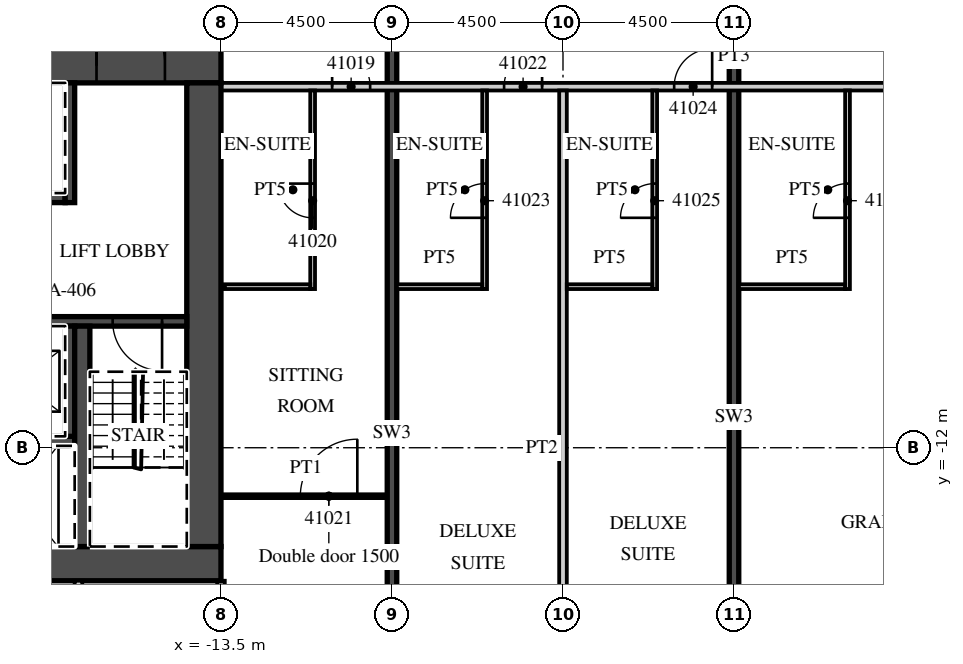
"""IFC4 building model, lengths in metres.
Left out: names, types, materials, properties, quantities, classifications, styles, units other than length and angle.
Written with IfcOpenShell. Run it as: python <this file> out.ifc"""

import sys

from ifc_helpers import new_model, si_unit, direction, frame, frame_2d, origin, place, context, subcontext, project, spatial, rectangle, extrude, element, fill, save


model = new_model("IFC4")
c1 = context("Model", 3, precision=1e-05, world=origin(), true_north=direction((0.0, 1.0)))
c2 = subcontext(c1, "Body", "Model", "MODEL_VIEW")
j1 = project(units=[si_unit("LENGTHUNIT", "METRE"), si_unit("PLANEANGLEUNIT", "RADIAN")], contexts=[c1])
p1 = place(None, origin())
s1 = spatial("IfcSite", under=j1, at=p1, CompositionType="ELEMENT")
p2 = place(p1, origin())
s2 = spatial("IfcBuilding", under=s1, at=p2, CompositionType="ELEMENT")
p3 = place(p2, frame((0.0, 0.0, 176.8)))
s3 = spatial("IfcBuildingStorey", under=s2, at=p3, CompositionType="ELEMENT", Elevation=176.8)
p4 = place(p3, frame((-9.0, -21.845, 0.0), z_axis=(0.0, 0.0, 1.0), x_axis=(0.0, 1.0, 0.0)))
e1 = element("IfcWall", 1, at=p4, inside=s3, PredefinedType="SHEAR", context=c2, shape_type="SweptSolid", body=[
    extrude(rectangle(XDim=20.445, YDim=0.25, at=frame_2d((10.223, 0.0))), origin(), (0.0, 0.0, 1.0), 3.3),
])
p5 = place(p3, frame((0.0, -20.979, 0.0), z_axis=(0.0, 0.0, 1.0), x_axis=(0.0, 1.0, 0.0)))
e2 = element("IfcWall", 2, at=p5, inside=s3, PredefinedType="SHEAR", context=c2, shape_type="SweptSolid", body=[
    extrude(rectangle(XDim=19.579, YDim=0.25, at=frame_2d((9.789, 0.0))), origin(), (0.0, 0.0, 1.0), 3.3),
])
p6 = place(p3, frame((-13.5, -22.3, 0.0), z_axis=(0.0, 0.0, 1.0), x_axis=(0.0, 1.0, 0.0)))
e3 = element("IfcWall", 3, at=p6, inside=s3, PredefinedType="PARTITIONING", context=c2, shape_type="SweptSolid", body=[
    extrude(rectangle(XDim=6.8, YDim=0.2, at=frame_2d((3.4, 0.0))), origin(), (0.0, 0.0, 1.0), 3.02),
])
p7 = place(p3, frame((-13.5, -2.5, 0.0), z_axis=(0.0, 0.0, 1.0), x_axis=(1.0, 0.0, 0.0)))
e4 = element("IfcWall", 4, at=p7, inside=s3, PredefinedType="PARTITIONING", context=c2, shape_type="SweptSolid", body=[
    extrude(rectangle(XDim=27.0, YDim=0.2, at=frame_2d((13.5, 0.0))), origin(), (0.0, 0.0, 1.0), 3.02),
])
p8 = place(p7, frame((2.925, 0.0, 0.0)))
e5 = element("IfcOpeningElement", 5, at=p8, cuts=e4, PredefinedType="OPENING", context=c2, shape_type="SweptSolid", body=[
    extrude(rectangle(XDim=1.0, YDim=2.1, at=frame_2d((0.5, 1.05))), frame((0.0, 0.11, 0.0), z_axis=(0.0, -1.0, 0.0), x_axis=(1.0, 0.0, 0.0)), (0.0, 0.0, 1.0), 0.22),
])
p9 = place(p7, frame((7.45, 0.0, 0.0)))
e6 = element("IfcOpeningElement", 6, at=p9, cuts=e4, PredefinedType="OPENING", context=c2, shape_type="SweptSolid", body=[
    extrude(rectangle(XDim=1.0, YDim=2.1, at=frame_2d((0.5, 1.05))), frame((0.0, 0.11, 0.0), z_axis=(0.0, -1.0, 0.0), x_axis=(1.0, 0.0, 0.0)), (0.0, 0.0, 1.0), 0.22),
])
p10 = place(p7, frame((11.925, 0.0, 0.0)))
e7 = element("IfcOpeningElement", 7, at=p10, cuts=e4, PredefinedType="OPENING", context=c2, shape_type="SweptSolid", body=[
    extrude(rectangle(XDim=1.0, YDim=2.1, at=frame_2d((0.5, 1.05))), frame((0.0, 0.11, 0.0), z_axis=(0.0, -1.0, 0.0), x_axis=(1.0, 0.0, 0.0)), (0.0, 0.0, 1.0), 0.22),
])
p11 = place(p7, frame((18.862, 0.0, 0.0)))
e8 = element("IfcOpeningElement", 8, at=p11, cuts=e4, PredefinedType="OPENING", context=c2, shape_type="SweptSolid", body=[
    extrude(rectangle(XDim=1.2, YDim=2.1, at=frame_2d((0.6, 1.05))), frame((0.0, 0.11, 0.0), z_axis=(0.0, -1.0, 0.0), x_axis=(1.0, 0.0, 0.0)), (0.0, 0.0, 1.0), 0.22),
])
p12 = place(p7, frame((25.425, 0.0, 0.0)))
e9 = element("IfcOpeningElement", 9, at=p12, cuts=e4, PredefinedType="OPENING", context=c2, shape_type="SweptSolid", body=[
    extrude(rectangle(XDim=1.0, YDim=2.1, at=frame_2d((0.5, 1.05))), frame((0.0, 0.11, 0.0), z_axis=(0.0, -1.0, 0.0), x_axis=(1.0, 0.0, 0.0)), (0.0, 0.0, 1.0), 0.22),
])
p13 = place(p3, frame((-11.088, -7.825, 0.0), z_axis=(0.0, 0.0, 1.0), x_axis=(0.0, 1.0, 0.0)))
e10 = element("IfcWall", 10, at=p13, inside=s3, PredefinedType="PARTITIONING", context=c2, shape_type="SweptSolid", body=[
    extrude(rectangle(XDim=5.225, YDim=0.125, at=frame_2d((2.612, 0.0))), origin(), (0.0, 0.0, 1.0), 3.02),
])
p14 = place(p13, frame((1.875, 0.0, 0.0)))
e11 = element("IfcOpeningElement", 11, at=p14, cuts=e10, PredefinedType="OPENING", context=c2, shape_type="SweptSolid", body=[
    extrude(rectangle(XDim=0.9, YDim=2.1, at=frame_2d((0.45, 1.05))), frame((0.0, 0.073, 0.0), z_axis=(0.0, -1.0, 0.0), x_axis=(1.0, 0.0, 0.0)), (0.0, 0.0, 1.0), 0.145),
])
p15 = place(p3, frame((-13.4, -7.762, 0.0), z_axis=(0.0, 0.0, 1.0), x_axis=(1.0, 0.0, 0.0)))
e12 = element("IfcWall", 12, at=p15, inside=s3, PredefinedType="PARTITIONING", context=c2, shape_type="SweptSolid", body=[
    extrude(rectangle(XDim=2.25, YDim=0.125, at=frame_2d((1.125, 0.0))), origin(), (0.0, 0.0, 1.0), 3.02),
])
p16 = place(p3, frame((-13.4, -13.275, 0.0), z_axis=(0.0, 0.0, 1.0), x_axis=(1.0, 0.0, 0.0)))
e13 = element("IfcWall", 13, at=p16, inside=s3, PredefinedType="PARTITIONING", context=c2, shape_type="SweptSolid", body=[
    extrude(rectangle(XDim=4.275, YDim=0.1, at=frame_2d((2.137, 0.0))), origin(), (0.0, 0.0, 1.0), 3.02),
])
p17 = place(p16, frame((1.988, 0.0, 0.0)))
e14 = element("IfcOpeningElement", 14, at=p17, cuts=e13, PredefinedType="OPENING", context=c2, shape_type="SweptSolid", body=[
    extrude(rectangle(XDim=1.5, YDim=2.1, at=frame_2d((0.75, 1.05))), frame((0.0, 0.06, 0.0), z_axis=(0.0, -1.0, 0.0), x_axis=(1.0, 0.0, 0.0)), (0.0, 0.0, 1.0), 0.12),
])
p18 = place(p3, frame((-4.5, -21.434, 0.0), z_axis=(0.0, 0.0, 1.0), x_axis=(0.0, 1.0, 0.0)))
e15 = element("IfcWall", 15, at=p18, inside=s3, PredefinedType="PARTITIONING", context=c2, shape_type="SweptSolid", body=[
    extrude(rectangle(XDim=18.834, YDim=0.2, at=frame_2d((9.417, 0.0))), origin(), (0.0, 0.0, 1.0), 3.02),
])
p19 = place(p3, frame((-6.562, -7.825, 0.0), z_axis=(0.0, 0.0, 1.0), x_axis=(0.0, 1.0, 0.0)))
e16 = element("IfcWall", 16, at=p19, inside=s3, PredefinedType="PARTITIONING", context=c2, shape_type="SweptSolid", body=[
    extrude(rectangle(XDim=5.225, YDim=0.125, at=frame_2d((2.612, 0.0))), origin(), (0.0, 0.0, 1.0), 3.02),
])
p20 = place(p19, frame((1.875, 0.0, 0.0)))
e17 = element("IfcOpeningElement", 17, at=p20, cuts=e16, PredefinedType="OPENING", context=c2, shape_type="SweptSolid", body=[
    extrude(rectangle(XDim=0.9, YDim=2.1, at=frame_2d((0.45, 1.05))), frame((0.0, 0.073, 0.0), z_axis=(0.0, -1.0, 0.0), x_axis=(1.0, 0.0, 0.0)), (0.0, 0.0, 1.0), 0.145),
])
p21 = place(p3, frame((-8.875, -7.762, 0.0), z_axis=(0.0, 0.0, 1.0), x_axis=(1.0, 0.0, 0.0)))
e18 = element("IfcWall", 18, at=p21, inside=s3, PredefinedType="PARTITIONING", context=c2, shape_type="SweptSolid", body=[
    extrude(rectangle(XDim=2.25, YDim=0.125, at=frame_2d((1.125, 0.0))), origin(), (0.0, 0.0, 1.0), 3.02),
])
p22 = place(p3, frame((-2.087, -7.825, 0.0), z_axis=(0.0, 0.0, 1.0), x_axis=(0.0, 1.0, 0.0)))
e19 = element("IfcWall", 19, at=p22, inside=s3, PredefinedType="PARTITIONING", context=c2, shape_type="SweptSolid", body=[
    extrude(rectangle(XDim=5.225, YDim=0.125, at=frame_2d((2.612, 0.0))), origin(), (0.0, 0.0, 1.0), 3.02),
])
p23 = place(p22, frame((1.875, 0.0, 0.0)))
e20 = element("IfcOpeningElement", 20, at=p23, cuts=e19, PredefinedType="OPENING", context=c2, shape_type="SweptSolid", body=[
    extrude(rectangle(XDim=0.9, YDim=2.1, at=frame_2d((0.45, 1.05))), frame((0.0, 0.073, 0.0), z_axis=(0.0, -1.0, 0.0), x_axis=(1.0, 0.0, 0.0)), (0.0, 0.0, 1.0), 0.145),
])
p24 = place(p3, frame((-4.4, -7.762, 0.0), z_axis=(0.0, 0.0, 1.0), x_axis=(1.0, 0.0, 0.0)))
e21 = element("IfcWall", 21, at=p24, inside=s3, PredefinedType="PARTITIONING", context=c2, shape_type="SweptSolid", body=[
    extrude(rectangle(XDim=2.25, YDim=0.125, at=frame_2d((1.125, 0.0))), origin(), (0.0, 0.0, 1.0), 3.02),
])
p25 = place(p3, frame((2.987, -7.825, 0.0), z_axis=(0.0, 0.0, 1.0), x_axis=(0.0, 1.0, 0.0)))
e22 = element("IfcWall", 22, at=p25, inside=s3, PredefinedType="PARTITIONING", context=c2, shape_type="SweptSolid", body=[
    extrude(rectangle(XDim=5.225, YDim=0.125, at=frame_2d((2.612, 0.0))), origin(), (0.0, 0.0, 1.0), 3.02),
])
p26 = place(p25, frame((1.875, 0.0, 0.0)))
e23 = element("IfcOpeningElement", 23, at=p26, cuts=e22, PredefinedType="OPENING", context=c2, shape_type="SweptSolid", body=[
    extrude(rectangle(XDim=0.9, YDim=2.1, at=frame_2d((0.45, 1.05))), frame((0.0, 0.073, 0.0), z_axis=(0.0, -1.0, 0.0), x_axis=(1.0, 0.0, 0.0)), (0.0, 0.0, 1.0), 0.145),
])
p27 = place(p3, frame((0.125, -7.762, 0.0), z_axis=(0.0, 0.0, 1.0), x_axis=(1.0, 0.0, 0.0)))
e24 = element("IfcWall", 24, at=p27, inside=s3, PredefinedType="PARTITIONING", context=c2, shape_type="SweptSolid", body=[
    extrude(rectangle(XDim=2.8, YDim=0.125, at=frame_2d((1.4, 0.0))), origin(), (0.0, 0.0, 1.0), 3.02),
])
p28 = place(p3, frame((-31.5, -1.95, 0.0), z_axis=(0.0, 0.0, 1.0), x_axis=(1.0, 0.0, 0.0)))
e25 = element("IfcWall", 25, at=p28, inside=s3, PredefinedType="SHEAR", context=c2, shape_type="SweptSolid", body=[
    extrude(rectangle(XDim=18.0, YDim=0.9, at=frame_2d((9.0, 0.0))), origin(), (0.0, 0.0, 1.0), 3.02),
])
p29 = place(p28, frame((14.725, 0.0, 0.0)))
e26 = element("IfcOpeningElement", 26, at=p29, cuts=e25, PredefinedType="OPENING", context=c2, shape_type="SweptSolid", body=[
    extrude(rectangle(XDim=1.8, YDim=2.1, at=frame_2d((0.9, 1.05))), frame((0.0, 0.46, 0.0), z_axis=(0.0, -1.0, 0.0), x_axis=(1.0, 0.0, 0.0)), (0.0, 0.0, 1.0), 0.92),
])
p30 = place(p3, frame((-20.3, -15.05, 0.0), z_axis=(0.0, 0.0, 1.0), x_axis=(1.0, 0.0, 0.0)))
e27 = element("IfcWall", 27, at=p30, inside=s3, PredefinedType="SHEAR", context=c2, shape_type="SweptSolid", body=[
    extrude(rectangle(XDim=6.8, YDim=0.9, at=frame_2d((3.4, 0.0))), origin(), (0.0, 0.0, 1.0), 3.02),
])
p31 = place(p30, frame((0.875, 0.0, 0.0)))
e28 = element("IfcOpeningElement", 28, at=p31, cuts=e27, PredefinedType="OPENING", context=c2, shape_type="SweptSolid", body=[
    extrude(rectangle(XDim=1.2, YDim=2.1, at=frame_2d((0.6, 1.05))), frame((0.0, 0.46, 0.0), z_axis=(0.0, -1.0, 0.0), x_axis=(1.0, 0.0, 0.0)), (0.0, 0.0, 1.0), 0.92),
])
p32 = place(p3, frame((-13.95, -14.6, 0.0), z_axis=(0.0, 0.0, 1.0), x_axis=(0.0, 1.0, 0.0)))
e29 = element("IfcWall", 29, at=p32, inside=s3, PredefinedType="SHEAR", context=c2, shape_type="SweptSolid", body=[
    extrude(rectangle(XDim=12.2, YDim=0.9, at=frame_2d((6.1, 0.0))), origin(), (0.0, 0.0, 1.0), 3.02),
])
p33 = place(p3, frame((-30.6, -5.425, 0.0), z_axis=(0.0, 0.0, 1.0), x_axis=(1.0, 0.0, 0.0)))
e30 = element("IfcWall", 30, at=p33, inside=s3, PredefinedType="SHEAR", context=c2, shape_type="SweptSolid", body=[
    extrude(rectangle(XDim=13.0, YDim=0.25, at=frame_2d((6.5, 0.0))), origin(), (0.0, 0.0, 1.0), 3.02),
])
p34 = place(p33, frame((3.325, 0.0, 0.0)))
e31 = element("IfcOpeningElement", 31, at=p34, cuts=e30, PredefinedType="OPENING", context=c2, shape_type="SweptSolid", body=[
    extrude(rectangle(XDim=1.2, YDim=2.1, at=frame_2d((0.6, 1.05))), frame((0.0, 0.135, 0.0), z_axis=(0.0, -1.0, 0.0), x_axis=(1.0, 0.0, 0.0)), (0.0, 0.0, 1.0), 0.27),
])
p35 = place(p33, frame((5.925, 0.0, 0.0)))
e32 = element("IfcOpeningElement", 32, at=p35, cuts=e30, PredefinedType="OPENING", context=c2, shape_type="SweptSolid", body=[
    extrude(rectangle(XDim=1.2, YDim=2.1, at=frame_2d((0.6, 1.05))), frame((0.0, 0.135, 0.0), z_axis=(0.0, -1.0, 0.0), x_axis=(1.0, 0.0, 0.0)), (0.0, 0.0, 1.0), 0.27),
])
p36 = place(p3, frame((-17.475, -5.55, 0.0), z_axis=(0.0, 0.0, 1.0), x_axis=(0.0, 1.0, 0.0)))
e33 = element("IfcWall", 33, at=p36, inside=s3, PredefinedType="SHEAR", context=c2, shape_type="SweptSolid", body=[
    extrude(rectangle(XDim=3.15, YDim=0.25, at=frame_2d((1.575, 0.0))), origin(), (0.0, 0.0, 1.0), 3.02),
])
p37 = place(p3, frame((-30.6, -8.675, 0.0), z_axis=(0.0, 0.0, 1.0), x_axis=(1.0, 0.0, 0.0)))
e34 = element("IfcWall", 34, at=p37, inside=s3, PredefinedType="SHEAR", context=c2, shape_type="SweptSolid", body=[
    extrude(rectangle(XDim=16.2, YDim=0.25, at=frame_2d((8.1, 0.0))), origin(), (0.0, 0.0, 1.0), 3.02),
])
p38 = place(p37, frame((8.55, 0.0, 0.0)))
e35 = element("IfcOpeningElement", 35, at=p38, cuts=e34, PredefinedType="OPENING", context=c2, shape_type="SweptSolid", body=[
    extrude(rectangle(XDim=1.2, YDim=2.1, at=frame_2d((0.6, 1.05))), frame((0.0, 0.135, 0.0), z_axis=(0.0, -1.0, 0.0), x_axis=(1.0, 0.0, 0.0)), (0.0, 0.0, 1.0), 0.27),
])
p39 = place(p37, frame((11.2, 0.0, 0.0)))
e36 = element("IfcOpeningElement", 36, at=p39, cuts=e34, PredefinedType="OPENING", context=c2, shape_type="SweptSolid", body=[
    extrude(rectangle(XDim=1.2, YDim=2.1, at=frame_2d((0.6, 1.05))), frame((0.0, 0.135, 0.0), z_axis=(0.0, -1.0, 0.0), x_axis=(1.0, 0.0, 0.0)), (0.0, 0.0, 1.0), 0.27),
])
p40 = place(p37, frame((14.25, 0.0, 0.0)))
e37 = element("IfcOpeningElement", 37, at=p40, cuts=e34, PredefinedType="OPENING", context=c2, shape_type="SweptSolid", body=[
    extrude(rectangle(XDim=1.3, YDim=2.1, at=frame_2d((0.65, 1.05))), frame((0.0, 0.135, 0.0), z_axis=(0.0, -1.0, 0.0), x_axis=(1.0, 0.0, 0.0)), (0.0, 0.0, 1.0), 0.27),
])
p41 = place(p37, frame((1.288, 0.0, 0.0)))
e38 = element("IfcOpeningElement", 38, at=p41, cuts=e34, PredefinedType="OPENING", context=c2, shape_type="SweptSolid", body=[
    extrude(rectangle(XDim=1.0, YDim=2.1, at=frame_2d((0.5, 1.05))), frame((0.0, 0.135, 0.0), z_axis=(0.0, -1.0, 0.0), x_axis=(1.0, 0.0, 0.0)), (0.0, 0.0, 1.0), 0.27),
])
p42 = place(p37, frame((5.262, 0.0, 0.0)))
e39 = element("IfcOpeningElement", 39, at=p42, cuts=e34, PredefinedType="OPENING", context=c2, shape_type="SweptSolid", body=[
    extrude(rectangle(XDim=1.0, YDim=2.1, at=frame_2d((0.5, 1.05))), frame((0.0, 0.135, 0.0), z_axis=(0.0, -1.0, 0.0), x_axis=(1.0, 0.0, 0.0)), (0.0, 0.0, 1.0), 0.27),
])
p43 = place(p3, frame((-30.6, -11.825, 0.0), z_axis=(0.0, 0.0, 1.0), x_axis=(1.0, 0.0, 0.0)))
e40 = element("IfcWall", 40, at=p43, inside=s3, PredefinedType="SHEAR", context=c2, shape_type="SweptSolid", body=[
    extrude(rectangle(XDim=13.25, YDim=0.25, at=frame_2d((6.625, 0.0))), origin(), (0.0, 0.0, 1.0), 3.02),
])
p44 = place(p3, frame((-17.475, -11.7, 0.0), z_axis=(0.0, 0.0, 1.0), x_axis=(0.0, 1.0, 0.0)))
e41 = element("IfcWall", 41, at=p44, inside=s3, PredefinedType="SHEAR", context=c2, shape_type="SweptSolid", body=[
    extrude(rectangle(XDim=2.9, YDim=0.25, at=frame_2d((1.45, 0.0))), origin(), (0.0, 0.0, 1.0), 3.02),
])
p45 = place(p3, frame((-17.15, -14.6, 0.0), z_axis=(0.0, 0.0, 1.0), x_axis=(0.0, 1.0, 0.0)))
e42 = element("IfcWall", 42, at=p45, inside=s3, PredefinedType="SHEAR", context=c2, shape_type="SweptSolid", body=[
    extrude(rectangle(XDim=5.8, YDim=0.4, at=frame_2d((2.9, 0.0))), origin(), (0.0, 0.0, 1.0), 3.02),
])
p46 = place(p3, frame((-17.25, -17.7, 0.0), z_axis=(0.0, 0.0, 1.0), x_axis=(0.0, 1.0, 0.0)))
e43 = element("IfcWall", 43, at=p46, inside=s3, PredefinedType="PARTITIONING", context=c2, shape_type="SweptSolid", body=[
    extrude(rectangle(XDim=2.2, YDim=0.2, at=frame_2d((1.1, 0.0))), origin(), (0.0, 0.0, 1.0), 3.02),
])
p47 = place(p8, origin())
e44 = element("IfcDoor", 44, at=p47, inside=s3, OperationType="SINGLE_SWING_LEFT", PredefinedType="DOOR", context=c2, shape_type="SweptSolid", body=[
    extrude(rectangle(XDim=1.0, YDim=2.1, at=frame_2d((0.5, 1.05))), frame((0.0, 0.025, 0.0), z_axis=(0.0, -1.0, 0.0), x_axis=(1.0, 0.0, 0.0)), (0.0, 0.0, 1.0), 0.05),
])
fill(e5, e44)
p48 = place(p14, origin())
e45 = element("IfcDoor", 45, at=p48, inside=s3, OperationType="SINGLE_SWING_RIGHT", PredefinedType="DOOR", context=c2, shape_type="SweptSolid", body=[
    extrude(rectangle(XDim=0.9, YDim=2.1, at=frame_2d((0.45, 1.05))), frame((0.0, 0.025, 0.0), z_axis=(0.0, -1.0, 0.0), x_axis=(1.0, 0.0, 0.0)), (0.0, 0.0, 1.0), 0.05),
])
fill(e11, e45)
p49 = place(p17, origin())
e46 = element("IfcDoor", 46, at=p49, inside=s3, OperationType="SINGLE_SWING_RIGHT", PredefinedType="DOOR", context=c2, shape_type="SweptSolid", body=[
    extrude(rectangle(XDim=1.5, YDim=2.1, at=frame_2d((0.75, 1.05))), frame((0.0, 0.025, 0.0), z_axis=(0.0, -1.0, 0.0), x_axis=(1.0, 0.0, 0.0)), (0.0, 0.0, 1.0), 0.05),
])
fill(e14, e46)
p50 = place(p9, origin())
e47 = element("IfcDoor", 47, at=p50, inside=s3, OperationType="SINGLE_SWING_RIGHT", PredefinedType="DOOR", context=c2, shape_type="SweptSolid", body=[
    extrude(rectangle(XDim=1.0, YDim=2.1, at=frame_2d((0.5, 1.05))), frame((0.0, 0.025, 0.0), z_axis=(0.0, -1.0, 0.0), x_axis=(1.0, 0.0, 0.0)), (0.0, 0.0, 1.0), 0.05),
])
fill(e6, e47)
p51 = place(p20, origin())
e48 = element("IfcDoor", 48, at=p51, inside=s3, OperationType="SINGLE_SWING_LEFT", PredefinedType="DOOR", context=c2, shape_type="SweptSolid", body=[
    extrude(rectangle(XDim=0.9, YDim=2.1, at=frame_2d((0.45, 1.05))), frame((0.0, 0.025, 0.0), z_axis=(0.0, -1.0, 0.0), x_axis=(1.0, 0.0, 0.0)), (0.0, 0.0, 1.0), 0.05),
])
fill(e17, e48)
p52 = place(p10, origin())
e49 = element("IfcDoor", 49, at=p52, inside=s3, OperationType="SINGLE_SWING_RIGHT", PredefinedType="DOOR", context=c2, shape_type="SweptSolid", body=[
    extrude(rectangle(XDim=1.0, YDim=2.1, at=frame_2d((0.5, 1.05))), frame((0.0, 0.025, 0.0), z_axis=(0.0, -1.0, 0.0), x_axis=(1.0, 0.0, 0.0)), (0.0, 0.0, 1.0), 0.05),
])
fill(e7, e49)
p53 = place(p23, origin())
e50 = element("IfcDoor", 50, at=p53, inside=s3, OperationType="SINGLE_SWING_LEFT", PredefinedType="DOOR", context=c2, shape_type="SweptSolid", body=[
    extrude(rectangle(XDim=0.9, YDim=2.1, at=frame_2d((0.45, 1.05))), frame((0.0, 0.025, 0.0), z_axis=(0.0, -1.0, 0.0), x_axis=(1.0, 0.0, 0.0)), (0.0, 0.0, 1.0), 0.05),
])
fill(e20, e50)
p54 = place(p26, origin())
e51 = element("IfcDoor", 51, at=p54, inside=s3, OperationType="SINGLE_SWING_LEFT", PredefinedType="DOOR", context=c2, shape_type="SweptSolid", body=[
    extrude(rectangle(XDim=0.9, YDim=2.1, at=frame_2d((0.45, 1.05))), frame((0.0, 0.025, 0.0), z_axis=(0.0, -1.0, 0.0), x_axis=(1.0, 0.0, 0.0)), (0.0, 0.0, 1.0), 0.05),
])
fill(e23, e51)
p55 = place(p29, origin())
e52 = element("IfcDoor", 52, at=p55, inside=s3, OperationType="DOUBLE_DOOR_DOUBLE_SWING", PredefinedType="DOOR", context=c2, shape_type="SweptSolid", body=[
    extrude(rectangle(XDim=1.8, YDim=2.1, at=frame_2d((0.9, 1.05))), frame((0.0, 0.025, 0.0), z_axis=(0.0, -1.0, 0.0), x_axis=(1.0, 0.0, 0.0)), (0.0, 0.0, 1.0), 0.05),
])
fill(e26, e52)
p56 = place(p40, origin())
e53 = element("IfcDoor", 53, at=p56, inside=s3, OperationType="SINGLE_SWING_RIGHT", PredefinedType="DOOR", context=c2, shape_type="SweptSolid", body=[
    extrude(rectangle(XDim=1.3, YDim=2.1, at=frame_2d((0.65, 1.05))), frame((0.0, 0.025, 0.0), z_axis=(0.0, -1.0, 0.0), x_axis=(1.0, 0.0, 0.0)), (0.0, 0.0, 1.0), 0.05),
])
fill(e37, e53)
save(model, sys.argv[1])
